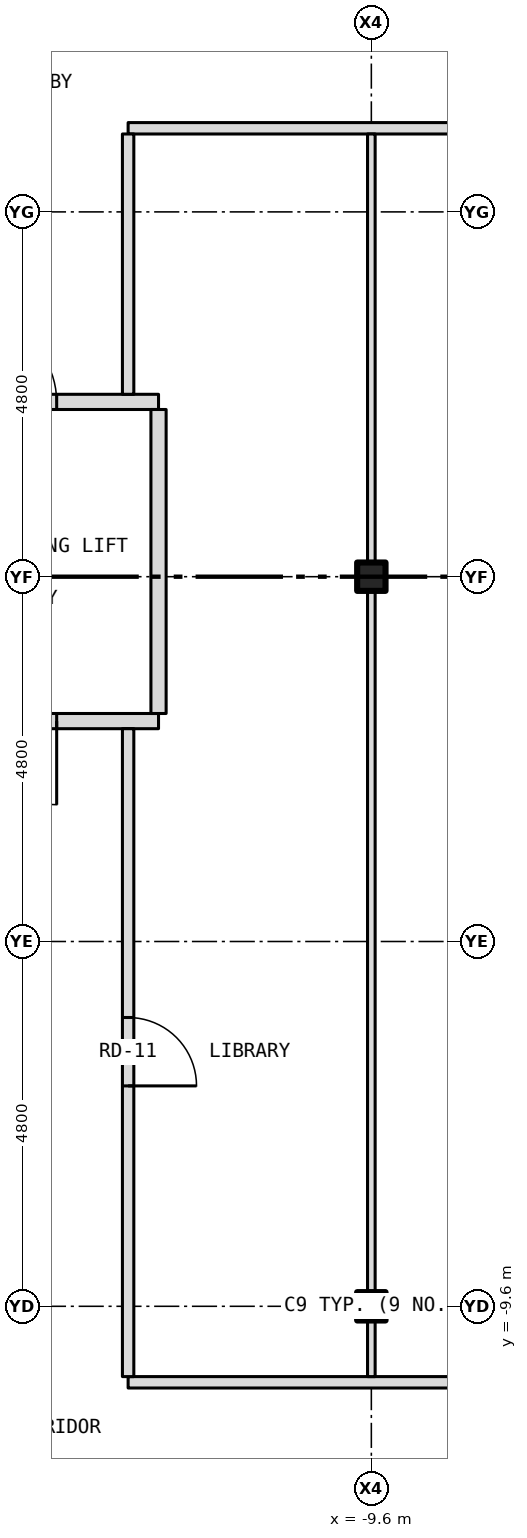
"""IFC4 building model, lengths in metres.
Left out: names, types, materials, properties, quantities, classifications, styles, units other than length and angle.
Written with IfcOpenShell. Run it as: python <this file> out.ifc"""

import sys

from ifc_helpers import new_model, si_unit, direction, frame, frame_2d, origin, origin_2d, place, context, subcontext, project, spatial, rectangle, i_section, extrude, element, fill, save


model = new_model("IFC4")
c1 = context("Model", 3, precision=1e-05, world=origin(), true_north=direction((0.0, 1.0)))
c2 = subcontext(c1, "Body", "Model", "MODEL_VIEW")
j1 = project(units=[si_unit("LENGTHUNIT", "METRE"), si_unit("PLANEANGLEUNIT", "RADIAN")], contexts=[c1])
p1 = place(None, origin())
s1 = spatial("IfcSite", under=j1, at=p1, CompositionType="ELEMENT")
p2 = place(p1, origin())
s2 = spatial("IfcBuilding", under=s1, at=p2, CompositionType="ELEMENT")
p3 = place(p2, frame((0.0, 0.0, 212.0)))
s3 = spatial("IfcBuildingStorey", under=s2, at=p3, CompositionType="ELEMENT", Elevation=212.0)
for number, where, z_axis, x_axis in (
    (1, (-9.6, -9.6, -0.15), (0.0, 0.0, 1.0), (1.0, 0.0, 0.0)),
    (2, (-9.6, 0.0, -0.15), (0.0, 0.0, 1.0), (1.0, 0.0, 0.0)),
):
    element("IfcColumn", number, at=place(p3, frame(where, z_axis=z_axis, x_axis=x_axis)), inside=s3, PredefinedType="COLUMN", context=c2, shape_type="SweptSolid", body=[
        extrude(i_section(OverallWidth=0.373, OverallDepth=0.373, WebThickness=0.016, FlangeThickness=0.026, at=origin_2d()), origin(), (0.0, 0.0, 1.0), 3.5),
    ])
p4 = place(p3, frame((-12.8, -10.6, 0.0), z_axis=(0.0, 0.0, 1.0), x_axis=(1.0, 0.0, 0.0)))
e3 = element("IfcWall", 3, at=p4, inside=s3, PredefinedType="PARTITIONING", context=c2, shape_type="SweptSolid", body=[
    extrude(rectangle(XDim=13.9, YDim=0.15, at=frame_2d((6.95, 0.0))), origin(), (0.0, 0.0, 1.0), 3.35),
])
p5 = place(p3, frame((-15.68, -1.9, 0.0), z_axis=(0.0, 0.0, 1.0), x_axis=(1.0, 0.0, 0.0)))
e4 = element("IfcWall", 4, at=p5, inside=s3, PredefinedType="PARTITIONING", context=c2, shape_type="SweptSolid", body=[
    extrude(rectangle(XDim=3.28, YDim=0.2, at=frame_2d((1.64, 0.0))), origin(), (0.0, 0.0, 1.0), 3.35),
])
p6 = place(p5, frame((0.84, 0.0, 0.0)))
e5 = element("IfcOpeningElement", 5, at=p6, cuts=e4, PredefinedType="OPENING", context=c2, shape_type="SweptSolid", body=[
    extrude(rectangle(XDim=1.1, YDim=2.1, at=frame_2d((0.55, 1.05))), frame((0.0, 0.112, 0.0), z_axis=(0.0, -1.0, 0.0), x_axis=(1.0, 0.0, 0.0)), (0.0, 0.0, 1.0), 0.224),
])
p7 = place(p3, frame((-15.68, 2.3, 0.0), z_axis=(0.0, 0.0, 1.0), x_axis=(1.0, 0.0, 0.0)))
e6 = element("IfcWall", 6, at=p7, inside=s3, PredefinedType="PARTITIONING", context=c2, shape_type="SweptSolid", body=[
    extrude(rectangle(XDim=3.28, YDim=0.2, at=frame_2d((1.64, 0.0))), origin(), (0.0, 0.0, 1.0), 3.35),
])
p8 = place(p7, frame((0.84, 0.0, 0.0)))
e7 = element("IfcOpeningElement", 7, at=p8, cuts=e6, PredefinedType="OPENING", context=c2, shape_type="SweptSolid", body=[
    extrude(rectangle(XDim=1.1, YDim=2.1, at=frame_2d((0.55, 1.05))), frame((0.0, 0.112, 0.0), z_axis=(0.0, -1.0, 0.0), x_axis=(1.0, 0.0, 0.0)), (0.0, 0.0, 1.0), 0.224),
])
p9 = place(p3, frame((-12.8, 5.9, 0.0), z_axis=(0.0, 0.0, 1.0), x_axis=(1.0, 0.0, 0.0)))
e8 = element("IfcWall", 8, at=p9, inside=s3, PredefinedType="PARTITIONING", context=c2, shape_type="SweptSolid", body=[
    extrude(rectangle(XDim=13.9, YDim=0.15, at=frame_2d((6.95, 0.0))), origin(), (0.0, 0.0, 1.0), 3.35),
])
p10 = place(p3, frame((-12.8, -10.525, 0.0), z_axis=(0.0, 0.0, 1.0), x_axis=(0.0, 1.0, 0.0)))
e9 = element("IfcWall", 9, at=p10, inside=s3, PredefinedType="PARTITIONING", context=c2, shape_type="SweptSolid", body=[
    extrude(rectangle(XDim=8.525, YDim=0.15, at=frame_2d((4.262, 0.0))), origin(), (0.0, 0.0, 1.0), 3.35),
])
p11 = place(p10, frame((3.825, 0.0, 0.0)))
e10 = element("IfcOpeningElement", 10, at=p11, cuts=e9, PredefinedType="OPENING", context=c2, shape_type="SweptSolid", body=[
    extrude(rectangle(XDim=0.9, YDim=2.1, at=frame_2d((0.45, 1.05))), frame((0.0, 0.087, 0.0), z_axis=(0.0, -1.0, 0.0), x_axis=(1.0, 0.0, 0.0)), (0.0, 0.0, 1.0), 0.174),
])
p12 = place(p3, frame((-12.8, 2.4, 0.0), z_axis=(0.0, 0.0, 1.0), x_axis=(0.0, 1.0, 0.0)))
e11 = element("IfcWall", 11, at=p12, inside=s3, PredefinedType="PARTITIONING", context=c2, shape_type="SweptSolid", body=[
    extrude(rectangle(XDim=3.425, YDim=0.15, at=frame_2d((1.712, 0.0))), origin(), (0.0, 0.0, 1.0), 3.35),
])
p13 = place(p3, frame((-12.4, -1.8, 0.0), z_axis=(0.0, 0.0, 1.0), x_axis=(0.0, 1.0, 0.0)))
e12 = element("IfcWall", 12, at=p13, inside=s3, PredefinedType="PARTITIONING", context=c2, shape_type="SweptSolid", body=[
    extrude(rectangle(XDim=4.0, YDim=0.2, at=frame_2d((2.0, 0.0))), origin(), (0.0, 0.0, 1.0), 3.35),
])
p14 = place(p3, frame((-9.6, -10.525, 0.0), z_axis=(0.0, 0.0, 1.0), x_axis=(0.0, 1.0, 0.0)))
e13 = element("IfcWall", 13, at=p14, inside=s3, PredefinedType="PARTITIONING", context=c2, shape_type="SweptSolid", body=[
    extrude(rectangle(XDim=0.738, YDim=0.1, at=frame_2d((0.369, 0.0))), origin(), (0.0, 0.0, 1.0), 2.728),
])
p15 = place(p3, frame((-9.6, -9.787, 0.0), z_axis=(0.0, 0.0, 1.0), x_axis=(0.0, 1.0, 0.0)))
e14 = element("IfcWall", 14, at=p15, inside=s3, PredefinedType="PARTITIONING", context=c2, shape_type="SweptSolid", body=[
    extrude(rectangle(XDim=0.374, YDim=0.1, at=frame_2d((0.187, 0.0))), origin(), (0.0, 0.0, 1.0), 3.35),
])
p16 = place(p3, frame((-9.6, -9.413, 0.0), z_axis=(0.0, 0.0, 1.0), x_axis=(0.0, 1.0, 0.0)))
e15 = element("IfcWall", 15, at=p16, inside=s3, PredefinedType="PARTITIONING", context=c2, shape_type="SweptSolid", body=[
    extrude(rectangle(XDim=9.226, YDim=0.1, at=frame_2d((4.613, 0.0))), origin(), (0.0, 0.0, 1.0), 2.728),
])
p17 = place(p3, frame((-9.6, -0.187, 0.0), z_axis=(0.0, 0.0, 1.0), x_axis=(0.0, 1.0, 0.0)))
e16 = element("IfcWall", 16, at=p17, inside=s3, PredefinedType="PARTITIONING", context=c2, shape_type="SweptSolid", body=[
    extrude(rectangle(XDim=0.374, YDim=0.1, at=frame_2d((0.187, 0.0))), origin(), (0.0, 0.0, 1.0), 3.35),
])
p18 = place(p3, frame((-9.6, 0.187, 0.0), z_axis=(0.0, 0.0, 1.0), x_axis=(0.0, 1.0, 0.0)))
e17 = element("IfcWall", 17, at=p18, inside=s3, PredefinedType="PARTITIONING", context=c2, shape_type="SweptSolid", body=[
    extrude(rectangle(XDim=5.638, YDim=0.1, at=frame_2d((2.819, 0.0))), origin(), (0.0, 0.0, 1.0), 2.728),
])
p19 = place(p8, origin())
e18 = element("IfcDoor", 18, at=p19, inside=s3, OperationType="SINGLE_SWING_LEFT", PredefinedType="DOOR", context=c2, shape_type="SweptSolid", body=[
    extrude(rectangle(XDim=1.1, YDim=2.1, at=frame_2d((0.55, 1.05))), frame((0.0, 0.025, 0.0), z_axis=(0.0, -1.0, 0.0), x_axis=(1.0, 0.0, 0.0)), (0.0, 0.0, 1.0), 0.05),
])
fill(e7, e18)
p20 = place(p6, origin())
e19 = element("IfcDoor", 19, at=p20, inside=s3, OperationType="SINGLE_SWING_RIGHT", PredefinedType="DOOR", context=c2, shape_type="SweptSolid", body=[
    extrude(rectangle(XDim=1.1, YDim=2.1, at=frame_2d((0.55, 1.05))), frame((0.0, 0.025, 0.0), z_axis=(0.0, -1.0, 0.0), x_axis=(1.0, 0.0, 0.0)), (0.0, 0.0, 1.0), 0.05),
])
fill(e5, e19)
p21 = place(p11, origin())
e20 = element("IfcDoor", 20, at=p21, inside=s3, OperationType="SINGLE_SWING_LEFT", PredefinedType="DOOR", context=c2, shape_type="SweptSolid", body=[
    extrude(rectangle(XDim=0.9, YDim=2.1, at=frame_2d((0.45, 1.05))), frame((0.0, 0.025, 0.0), z_axis=(0.0, -1.0, 0.0), x_axis=(1.0, 0.0, 0.0)), (0.0, 0.0, 1.0), 0.05),
])
fill(e10, e20)
save(model, sys.argv[1])
